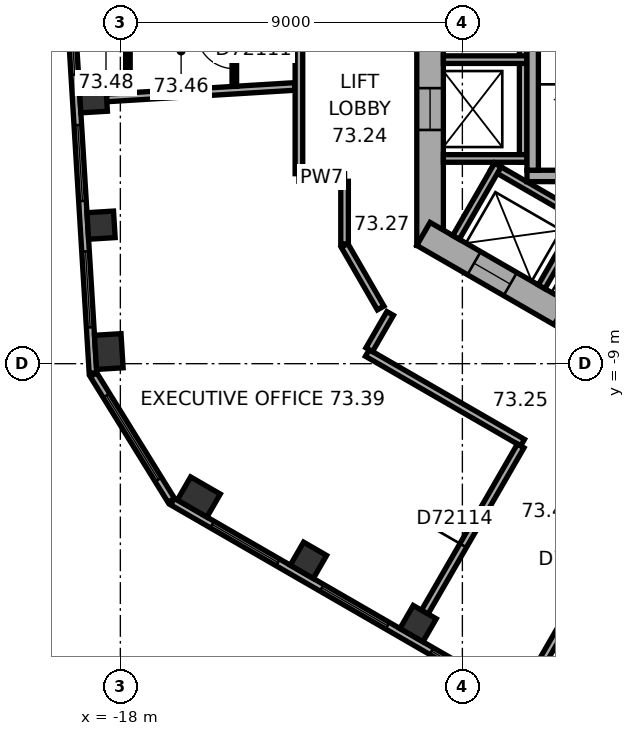
"""IFC4 building model, lengths in metres.
Left out: names, types, materials, properties, quantities, classifications, styles, units other than length and angle.
Written with IfcOpenShell. Run it as: python <this file> out.ifc"""

import sys

from ifc_helpers import new_model, si_unit, direction, frame, frame_2d, origin, origin_2d, place, context, subcontext, project, spatial, rectangle, extrude, element, fill, save


model = new_model("IFC4")
c1 = context("Model", 3, precision=1e-05, world=origin(), true_north=direction((0.0, 1.0)))
c2 = subcontext(c1, "Body", "Model", "MODEL_VIEW")
j1 = project(units=[si_unit("LENGTHUNIT", "METRE"), si_unit("PLANEANGLEUNIT", "RADIAN")], contexts=[c1])
p1 = place(None, origin())
s1 = spatial("IfcSite", under=j1, at=p1, CompositionType="ELEMENT")
p2 = place(p1, origin())
s2 = spatial("IfcBuilding", under=s1, at=p2, CompositionType="ELEMENT")
p3 = place(p2, frame((0.0, 0.0, 296.8)))
s3 = spatial("IfcBuildingStorey", under=s2, at=p3, CompositionType="ELEMENT", Elevation=296.8)
for number, where, z_axis, x_axis in (
    (1, (-18.711, -2.03, 0.0), (0.0, 0.0, 1.0), (0.061, -0.998, 0.0)),
    (2, (-18.508, -5.355, 0.0), (0.0, 0.0, 1.0), (0.061, -0.998, 0.0)),
):
    element("IfcColumn", number, at=place(p3, frame(where, z_axis=z_axis, x_axis=x_axis)), inside=s3, PredefinedType="COLUMN", context=c2, shape_type="SweptSolid", body=[
        extrude(rectangle(XDim=0.7, YDim=0.7, at=origin_2d()), origin(), (0.0, 0.0, 1.0), 3.7),
    ])
for number, where, z_axis, x_axis in (
    (3, (-18.304, -8.68, 0.0), (0.0, 0.0, 1.0), (0.061, -0.998, 0.0)),
    (4, (-15.936, -12.508, 0.0), (0.0, 0.0, 1.0), (0.866, -0.5, 0.0)),
):
    element("IfcColumn", number, at=place(p3, frame(where, z_axis=z_axis, x_axis=x_axis)), inside=s3, PredefinedType="COLUMN", context=c2, shape_type="SweptSolid", body=[
        extrude(rectangle(XDim=0.9, YDim=0.7, at=origin_2d()), origin(), (0.0, 0.0, 1.0), 3.7),
    ])
for number, where, z_axis, x_axis in (
    (5, (-13.05, -14.174, 0.0), (0.0, 0.0, 1.0), (0.866, -0.5, 0.0)),
    (6, (-10.165, -15.84, 0.0), (0.0, 0.0, 1.0), (0.866, -0.5, 0.0)),
):
    element("IfcColumn", number, at=place(p3, frame(where, z_axis=z_axis, x_axis=x_axis)), inside=s3, PredefinedType="COLUMN", context=c2, shape_type="SweptSolid", body=[
        extrude(rectangle(XDim=0.7, YDim=0.7, at=origin_2d()), origin(), (0.0, 0.0, 1.0), 3.7),
    ])
p4 = place(p3, frame((-9.85, 5.889, 0.0), z_axis=(0.0, 0.0, 1.0), x_axis=(0.0, -1.0, 0.0)))
e7 = element("IfcWall", 7, at=p4, inside=s3, PredefinedType="SHEAR", context=c2, shape_type="SweptSolid", body=[
    extrude(rectangle(XDim=11.778, YDim=0.7, at=frame_2d((5.889, 0.0))), origin(), (0.0, 0.0, 1.0), 3.7),
])
p5 = place(p4, frame((5.039, 0.0, 0.0)))
e8 = element("IfcOpeningElement", 8, at=p5, cuts=e7, PredefinedType="OPENING", context=c2, shape_type="SweptSolid", body=[
    extrude(rectangle(XDim=1.1, YDim=2.1, at=frame_2d((0.55, 1.05))), frame((0.0, 0.36, 0.0), z_axis=(0.0, -1.0, 0.0), x_axis=(1.0, 0.0, 0.0)), (0.0, 0.0, 1.0), 0.72),
])
p6 = place(p4, frame((7.639, 0.0, 0.0)))
e9 = element("IfcOpeningElement", 9, at=p6, cuts=e7, PredefinedType="OPENING", context=c2, shape_type="SweptSolid", body=[
    extrude(rectangle(XDim=1.1, YDim=2.1, at=frame_2d((0.55, 1.05))), frame((0.0, 0.36, 0.0), z_axis=(0.0, -1.0, 0.0), x_axis=(1.0, 0.0, 0.0)), (0.0, 0.0, 1.0), 0.72),
])
p7 = place(p3, frame((-10.025, -5.586, 0.0), z_axis=(0.0, 0.0, 1.0), x_axis=(0.866026453023, -0.499998182661, 0.0)))
e10 = element("IfcWall", 10, at=p7, inside=s3, PredefinedType="SHEAR", context=c2, shape_type="SweptSolid", body=[
    extrude(rectangle(XDim=11.778, YDim=0.7, at=frame_2d((5.889, 0.0))), origin(), (0.0, 0.0, 1.0), 3.7),
])
p8 = place(p7, frame((6.089, 0.0, 0.0)))
e11 = element("IfcOpeningElement", 11, at=p8, cuts=e10, PredefinedType="OPENING", context=c2, shape_type="SweptSolid", body=[
    extrude(rectangle(XDim=1.5, YDim=2.1, at=frame_2d((0.75, 1.05))), frame((0.0, 0.36, 0.0), z_axis=(0.0, -1.0, 0.0), x_axis=(1.0, 0.0, 0.0)), (0.0, 0.0, 1.0), 0.72),
])
p9 = place(p7, frame((1.539, 0.0, 0.0)))
e12 = element("IfcOpeningElement", 12, at=p9, cuts=e10, PredefinedType="OPENING", context=c2, shape_type="SweptSolid", body=[
    extrude(rectangle(XDim=1.1, YDim=2.1, at=frame_2d((0.55, 1.05))), frame((0.0, 0.36, 0.0), z_axis=(0.0, -1.0, 0.0), x_axis=(1.0, 0.0, 0.0)), (0.0, 0.0, 1.0), 0.72),
])
p10 = place(p7, frame((4.139, 0.0, 0.0)))
e13 = element("IfcOpeningElement", 13, at=p10, cuts=e10, PredefinedType="OPENING", context=c2, shape_type="SweptSolid", body=[
    extrude(rectangle(XDim=1.1, YDim=2.1, at=frame_2d((0.55, 1.05))), frame((0.0, 0.36, 0.0), z_axis=(0.0, -1.0, 0.0), x_axis=(1.0, 0.0, 0.0)), (0.0, 0.0, 1.0), 0.72),
])
p11 = place(p3, frame((-19.803, 8.454, 0.0), z_axis=(0.0, 0.0, 1.0), x_axis=(0.061036717565, -0.998135521414, 0.0)))
e14 = element("IfcWall", 14, at=p11, inside=s3, PredefinedType="STANDARD", context=c2, shape_type="SweptSolid", body=[
    extrude(rectangle(XDim=17.731, YDim=0.2, at=frame_2d((8.866, 0.0))), origin(), (0.0, 0.0, 1.0), 3.7),
])
p12 = place(p11, frame((1.202, 0.0, 0.9)))
e15 = element("IfcOpeningElement", 15, at=p12, cuts=e14, PredefinedType="OPENING", context=c2, shape_type="SweptSolid", body=[
    extrude(rectangle(XDim=2.0, YDim=2.0, at=frame_2d((1.0, 1.0))), frame((0.0, 0.11, 0.0), z_axis=(0.0, -1.0, 0.0), x_axis=(1.0, 0.0, 0.0)), (0.0, 0.0, 1.0), 0.22),
])
p13 = place(p11, frame((4.533, 0.0, 0.9)))
e16 = element("IfcOpeningElement", 16, at=p13, cuts=e14, PredefinedType="OPENING", context=c2, shape_type="SweptSolid", body=[
    extrude(rectangle(XDim=2.0, YDim=2.0, at=frame_2d((1.0, 1.0))), frame((0.0, 0.11, 0.0), z_axis=(0.0, -1.0, 0.0), x_axis=(1.0, 0.0, 0.0)), (0.0, 0.0, 1.0), 0.22),
])
p14 = place(p11, frame((7.865, 0.0, 0.9)))
e17 = element("IfcOpeningElement", 17, at=p14, cuts=e14, PredefinedType="OPENING", context=c2, shape_type="SweptSolid", body=[
    extrude(rectangle(XDim=2.0, YDim=2.0, at=frame_2d((1.0, 1.0))), frame((0.0, 0.11, 0.0), z_axis=(0.0, -1.0, 0.0), x_axis=(1.0, 0.0, 0.0)), (0.0, 0.0, 1.0), 0.22),
])
p15 = place(p11, frame((11.197, 0.0, 0.9)))
e18 = element("IfcOpeningElement", 18, at=p15, cuts=e14, PredefinedType="OPENING", context=c2, shape_type="SweptSolid", body=[
    extrude(rectangle(XDim=2.0, YDim=2.0, at=frame_2d((1.0, 1.0))), frame((0.0, 0.11, 0.0), z_axis=(0.0, -1.0, 0.0), x_axis=(1.0, 0.0, 0.0)), (0.0, 0.0, 1.0), 0.22),
])
p16 = place(p11, frame((14.528, 0.0, 0.9)))
e19 = element("IfcOpeningElement", 19, at=p16, cuts=e14, PredefinedType="OPENING", context=c2, shape_type="SweptSolid", body=[
    extrude(rectangle(XDim=2.0, YDim=2.0, at=frame_2d((1.0, 1.0))), frame((0.0, 0.11, 0.0), z_axis=(0.0, -1.0, 0.0), x_axis=(1.0, 0.0, 0.0)), (0.0, 0.0, 1.0), 0.22),
])
p17 = place(p3, frame((-18.706, -9.291, 0.0), z_axis=(0.0, 0.0, 1.0), x_axis=(0.526209683648, -0.850354848775, 0.0)))
e20 = element("IfcWall", 20, at=p17, inside=s3, PredefinedType="STANDARD", context=c2, shape_type="SweptSolid", body=[
    extrude(rectangle(XDim=3.886, YDim=0.2, at=frame_2d((1.943, 0.0))), origin(), (0.0, 0.0, 1.0), 3.7),
])
p18 = place(p17, frame((0.643, 0.0, 0.9)))
e21 = element("IfcOpeningElement", 21, at=p18, cuts=e20, PredefinedType="OPENING", context=c2, shape_type="SweptSolid", body=[
    extrude(rectangle(XDim=2.6, YDim=2.0, at=frame_2d((1.3, 1.0))), frame((0.0, 0.11, 0.0), z_axis=(0.0, -1.0, 0.0), x_axis=(1.0, 0.0, 0.0)), (0.0, 0.0, 1.0), 0.22),
])
p19 = place(p3, frame((-16.626, -12.629, 0.0), z_axis=(0.0, 0.0, 1.0), x_axis=(0.866026460444, -0.499998169808, 0.0)))
e22 = element("IfcWall", 22, at=p19, inside=s3, PredefinedType="STANDARD", context=c2, shape_type="SweptSolid", body=[
    extrude(rectangle(XDim=17.731, YDim=0.2, at=frame_2d((8.866, 0.0))), origin(), (0.0, 0.0, 1.0), 3.7),
])
p20 = place(p19, frame((1.203, 0.0, 0.9)))
e23 = element("IfcOpeningElement", 23, at=p20, cuts=e22, PredefinedType="OPENING", context=c2, shape_type="SweptSolid", body=[
    extrude(rectangle(XDim=2.0, YDim=2.0, at=frame_2d((1.0, 1.0))), frame((0.0, 0.11, 0.0), z_axis=(0.0, -1.0, 0.0), x_axis=(1.0, 0.0, 0.0)), (0.0, 0.0, 1.0), 0.22),
])
p21 = place(p19, frame((4.535, 0.0, 0.9)))
e24 = element("IfcOpeningElement", 24, at=p21, cuts=e22, PredefinedType="OPENING", context=c2, shape_type="SweptSolid", body=[
    extrude(rectangle(XDim=2.0, YDim=2.0, at=frame_2d((1.0, 1.0))), frame((0.0, 0.11, 0.0), z_axis=(0.0, -1.0, 0.0), x_axis=(1.0, 0.0, 0.0)), (0.0, 0.0, 1.0), 0.22),
])
p22 = place(p19, frame((7.867, 0.0, 0.9)))
e25 = element("IfcOpeningElement", 25, at=p22, cuts=e22, PredefinedType="OPENING", context=c2, shape_type="SweptSolid", body=[
    extrude(rectangle(XDim=2.0, YDim=2.0, at=frame_2d((1.0, 1.0))), frame((0.0, 0.11, 0.0), z_axis=(0.0, -1.0, 0.0), x_axis=(1.0, 0.0, 0.0)), (0.0, 0.0, 1.0), 0.22),
])
p23 = place(p19, frame((11.198, 0.0, 0.9)))
e26 = element("IfcOpeningElement", 26, at=p23, cuts=e22, PredefinedType="OPENING", context=c2, shape_type="SweptSolid", body=[
    extrude(rectangle(XDim=2.0, YDim=2.0, at=frame_2d((1.0, 1.0))), frame((0.0, 0.11, 0.0), z_axis=(0.0, -1.0, 0.0), x_axis=(1.0, 0.0, 0.0)), (0.0, 0.0, 1.0), 0.22),
])
p24 = place(p19, frame((14.53, 0.0, 0.9)))
e27 = element("IfcOpeningElement", 27, at=p24, cuts=e22, PredefinedType="OPENING", context=c2, shape_type="SweptSolid", body=[
    extrude(rectangle(XDim=2.0, YDim=2.0, at=frame_2d((1.0, 1.0))), frame((0.0, 0.11, 0.0), z_axis=(0.0, -1.0, 0.0), x_axis=(1.0, 0.0, 0.0)), (0.0, 0.0, 1.0), 0.22),
])
p25 = place(p3, frame((-7.4, 4.3, 0.0), z_axis=(0.0, 0.0, 1.0), x_axis=(0.0, -1.0, 0.0)))
e28 = element("IfcWall", 28, at=p25, inside=s3, PredefinedType="PARTITIONING", context=c2, shape_type="SweptSolid", body=[
    extrude(rectangle(XDim=8.0, YDim=0.2, at=frame_2d((4.0, 0.0))), origin(), (0.0, 0.0, 1.0), 3.35),
])
for number, where, z_axis, x_axis in (
    (29, (-7.3, -1.0, 0.0), (0.0, 0.0, 1.0), (-1.0, 0.0, 0.0)),
    (30, (-7.3, -3.6, 0.0), (0.0, 0.0, 1.0), (-1.0, 0.0, 0.0)),
):
    element("IfcWall", number, at=place(p3, frame(where, z_axis=z_axis, x_axis=x_axis)), inside=s3, PredefinedType="PARTITIONING", context=c2, shape_type="SweptSolid", body=[
        extrude(rectangle(XDim=2.2, YDim=0.2, at=frame_2d((1.1, 0.0))), origin(), (0.0, 0.0, 1.0), 3.35),
    ])
p26 = place(p3, frame((-8.203, -3.809, 0.0), z_axis=(0.0, 0.0, 1.0), x_axis=(0.866028230842, -0.499995103361, 0.0)))
e31 = element("IfcWall", 31, at=p26, inside=s3, PredefinedType="PARTITIONING", context=c2, shape_type="SweptSolid", body=[
    extrude(rectangle(XDim=5.4, YDim=0.2, at=frame_2d((2.7, 0.0))), origin(), (0.0, 0.0, 1.0), 3.35),
])
for number, where, z_axis, x_axis in (
    (32, (-8.067, -3.772, 0.0), (0.0, 0.0, 1.0), (-0.5, -0.866, 0.0)),
    (33, (-5.815, -5.072, 0.0), (0.0, 0.0, 1.0), (-0.5, -0.866, 0.0)),
):
    element("IfcWall", number, at=place(p3, frame(where, z_axis=z_axis, x_axis=x_axis)), inside=s3, PredefinedType="PARTITIONING", context=c2, shape_type="SweptSolid", body=[
        extrude(rectangle(XDim=2.2, YDim=0.2, at=frame_2d((1.1, 0.0))), origin(), (0.0, 0.0, 1.0), 3.35),
    ])
p27 = place(p3, frame((-2.6, -4.06, 0.0), z_axis=(0.0, 0.0, 1.0), x_axis=(-1.0, 0.0, 0.0)))
e34 = element("IfcWall", 34, at=p27, inside=s3, PredefinedType="SHEAR", context=c2, shape_type="SweptSolid", body=[
    extrude(rectangle(XDim=4.7, YDim=0.3, at=frame_2d((2.35, 0.0))), origin(), (0.0, 0.0, 1.0), 3.35),
])
p28 = place(p3, frame((-7.15, 3.15, 0.0), z_axis=(0.0, 0.0, 1.0), x_axis=(0.0, -1.0, 0.0)))
e35 = element("IfcWall", 35, at=p28, inside=s3, PredefinedType="SHEAR", context=c2, shape_type="SweptSolid", body=[
    extrude(rectangle(XDim=7.06, YDim=0.3, at=frame_2d((3.53, 0.0))), origin(), (0.0, 0.0, 1.0), 3.35),
])
p29 = place(p3, frame((-18.362, -2.008, 0.0), z_axis=(0.0, 0.0, 1.0), x_axis=(0.998135748374, 0.061033005966, 0.0)))
e36 = element("IfcWall", 36, at=p29, inside=s3, PredefinedType="PARTITIONING", context=c2, shape_type="SweptSolid", body=[
    extrude(rectangle(XDim=4.96, YDim=0.2, at=frame_2d((2.48, 0.0))), origin(), (0.0, 0.0, 1.0), 3.35),
])
p30 = place(p3, frame((-17.801, 0.226, 0.0), z_axis=(0.0, 0.0, 1.0), x_axis=(0.0, -1.0, 0.0)))
e37 = element("IfcWall", 37, at=p30, inside=s3, PredefinedType="PARTITIONING", context=c2, shape_type="SweptSolid", body=[
    extrude(rectangle(XDim=2.1, YDim=0.12, at=frame_2d((1.05, 0.0))), origin(), (0.0, 0.0, 1.0), 3.35),
])
p31 = place(p3, frame((-15.001, 4.773, 0.0), z_axis=(0.0, 0.0, 1.0), x_axis=(0.0, -1.0, 0.0)))
e38 = element("IfcWall", 38, at=p31, inside=s3, PredefinedType="PARTITIONING", context=c2, shape_type="SweptSolid", body=[
    extrude(rectangle(XDim=6.476, YDim=0.12, at=frame_2d((3.238, 0.0))), origin(), (0.0, 0.0, 1.0), 3.35),
])
p32 = place(p31, frame((5.011, 0.0, 0.0)))
e39 = element("IfcOpeningElement", 39, at=p32, cuts=e38, PredefinedType="OPENING", context=c2, shape_type="SweptSolid", body=[
    extrude(rectangle(XDim=1.0, YDim=2.1, at=frame_2d((0.5, 1.05))), frame((0.0, 0.07, 0.0), z_axis=(0.0, -1.0, 0.0), x_axis=(1.0, 0.0, 0.0)), (0.0, 0.0, 1.0), 0.14),
])
p33 = place(p31, frame((0.8, 0.0, 0.0)))
e40 = element("IfcOpeningElement", 40, at=p33, cuts=e38, PredefinedType="OPENING", context=c2, shape_type="SweptSolid", body=[
    extrude(rectangle(XDim=0.9, YDim=2.1, at=frame_2d((0.45, 1.05))), frame((0.0, 0.07, 0.0), z_axis=(0.0, -1.0, 0.0), x_axis=(1.0, 0.0, 0.0)), (0.0, 0.0, 1.0), 0.14),
])
p34 = place(p31, frame((3.073, 0.0, 0.0)))
e41 = element("IfcOpeningElement", 41, at=p34, cuts=e38, PredefinedType="OPENING", context=c2, shape_type="SweptSolid", body=[
    extrude(rectangle(XDim=0.9, YDim=2.1, at=frame_2d((0.45, 1.05))), frame((0.0, 0.07, 0.0), z_axis=(0.0, -1.0, 0.0), x_axis=(1.0, 0.0, 0.0)), (0.0, 0.0, 1.0), 0.14),
])
p35 = place(p3, frame((-13.301, -4.101, 0.0), z_axis=(0.0, 0.0, 1.0), x_axis=(1.0, 0.0, 0.0)))
e42 = element("IfcWall", 42, at=p35, inside=s3, PredefinedType="PARTITIONING", context=c2, shape_type="SweptSolid", body=[
    extrude(rectangle(XDim=1.201, YDim=0.2, at=frame_2d((0.601, 0.0))), origin(), (0.0, 0.0, 1.0), 3.35),
])
p36 = place(p3, frame((-13.301, 2.101, 0.0), z_axis=(0.0, 0.0, 1.0), x_axis=(0.0, -1.0, 0.0)))
e43 = element("IfcWall", 43, at=p36, inside=s3, PredefinedType="PARTITIONING", context=c2, shape_type="SweptSolid", body=[
    extrude(rectangle(XDim=6.102, YDim=0.2, at=frame_2d((3.051, 0.0))), origin(), (0.0, 0.0, 1.0), 3.35),
])
p37 = place(p36, frame((1.4, 0.0, 0.0)))
e44 = element("IfcOpeningElement", 44, at=p37, cuts=e43, PredefinedType="OPENING", context=c2, shape_type="SweptSolid", body=[
    extrude(rectangle(XDim=1.0, YDim=2.1, at=frame_2d((0.5, 1.05))), frame((0.0, 0.11, 0.0), z_axis=(0.0, -1.0, 0.0), x_axis=(1.0, 0.0, 0.0)), (0.0, 0.0, 1.0), 0.22),
])
p38 = place(p3, frame((-12.1, -5.889, 0.0), z_axis=(0.0, 0.0, 1.0), x_axis=(0.500063520245, -0.865988727248, 0.0)))
e45 = element("IfcWall", 45, at=p38, inside=s3, PredefinedType="PARTITIONING", context=c2, shape_type="SweptSolid", body=[
    extrude(rectangle(XDim=1.9, YDim=0.2, at=frame_2d((0.95, 0.0))), origin(), (0.0, 0.0, 1.0), 3.35),
])
p39 = place(p3, frame((-12.1, -4.201, 0.0), z_axis=(0.0, 0.0, 1.0), x_axis=(0.0, -1.0, 0.0)))
e46 = element("IfcWall", 46, at=p39, inside=s3, PredefinedType="PARTITIONING", context=c2, shape_type="SweptSolid", body=[
    extrude(rectangle(XDim=1.648, YDim=0.2, at=frame_2d((0.824, 0.0))), origin(), (0.0, 0.0, 1.0), 3.35),
])
p40 = place(p3, frame((-11.501, -8.719, 0.0), z_axis=(0.0, 0.0, 1.0), x_axis=(0.866024434742, -0.500001678427, 0.0)))
e47 = element("IfcWall", 47, at=p40, inside=s3, PredefinedType="PARTITIONING", context=c2, shape_type="SweptSolid", body=[
    extrude(rectangle(XDim=4.718, YDim=0.2, at=frame_2d((2.359, 0.0))), origin(), (0.0, 0.0, 1.0), 3.35),
])
p41 = place(p3, frame((-10.901, -7.678, 0.0), z_axis=(0.0, 0.0, 1.0), x_axis=(-0.500074377092, -0.865982457891, 0.0)))
e48 = element("IfcWall", 48, at=p41, inside=s3, PredefinedType="PARTITIONING", context=c2, shape_type="SweptSolid", body=[
    extrude(rectangle(XDim=1.101, YDim=0.2, at=frame_2d((0.55, 0.0))), origin(), (0.0, 0.0, 1.0), 3.35),
])
p42 = place(p3, frame((-9.99, -15.537, 0.0), z_axis=(0.0, 0.0, 1.0), x_axis=(0.499966611936, 0.866044679534, 0.0)))
e49 = element("IfcWall", 49, at=p42, inside=s3, PredefinedType="PARTITIONING", context=c2, shape_type="SweptSolid", body=[
    extrude(rectangle(XDim=5.049, YDim=0.2, at=frame_2d((2.524, 0.0))), origin(), (0.0, 0.0, 1.0), 2.65),
])
p43 = place(p42, frame((2.024, 0.0, 0.0)))
e50 = element("IfcOpeningElement", 50, at=p43, cuts=e49, PredefinedType="OPENING", context=c2, shape_type="SweptSolid", body=[
    extrude(rectangle(XDim=1.0, YDim=2.1, at=frame_2d((0.5, 1.05))), frame((0.0, 0.11, 0.0), z_axis=(0.0, -1.0, 0.0), x_axis=(1.0, 0.0, 0.0)), (0.0, 0.0, 1.0), 0.22),
])
p44 = place(p3, frame((-7.105, -17.202, 0.0), z_axis=(0.0, 0.0, 1.0), x_axis=(0.499988692146, 0.866031932279, 0.0)))
e51 = element("IfcWall", 51, at=p44, inside=s3, PredefinedType="PARTITIONING", context=c2, shape_type="SweptSolid", body=[
    extrude(rectangle(XDim=6.35, YDim=0.2, at=frame_2d((3.175, 0.0))), origin(), (0.0, 0.0, 1.0), 3.35),
])
p45 = place(p44, frame((2.675, 0.0, 0.0)))
e52 = element("IfcOpeningElement", 52, at=p45, cuts=e51, PredefinedType="OPENING", context=c2, shape_type="SweptSolid", body=[
    extrude(rectangle(XDim=1.0, YDim=2.1, at=frame_2d((0.5, 1.05))), frame((0.0, 0.11, 0.0), z_axis=(0.0, -1.0, 0.0), x_axis=(1.0, 0.0, 0.0)), (0.0, 0.0, 1.0), 0.22),
])
p46 = place(p14, origin())
e53 = element("IfcWindow", 53, at=p46, inside=s3, PartitioningType="SINGLE_PANEL", PredefinedType="WINDOW", context=c2, shape_type="SweptSolid", body=[
    extrude(rectangle(XDim=2.0, YDim=2.0, at=frame_2d((1.0, 1.0))), frame((0.0, 0.03, 0.0), z_axis=(0.0, -1.0, 0.0), x_axis=(1.0, 0.0, 0.0)), (0.0, 0.0, 1.0), 0.06),
])
fill(e17, e53)
p47 = place(p15, origin())
e54 = element("IfcWindow", 54, at=p47, inside=s3, PartitioningType="SINGLE_PANEL", PredefinedType="WINDOW", context=c2, shape_type="SweptSolid", body=[
    extrude(rectangle(XDim=2.0, YDim=2.0, at=frame_2d((1.0, 1.0))), frame((0.0, 0.03, 0.0), z_axis=(0.0, -1.0, 0.0), x_axis=(1.0, 0.0, 0.0)), (0.0, 0.0, 1.0), 0.06),
])
fill(e18, e54)
p48 = place(p16, origin())
e55 = element("IfcWindow", 55, at=p48, inside=s3, PartitioningType="SINGLE_PANEL", PredefinedType="WINDOW", context=c2, shape_type="SweptSolid", body=[
    extrude(rectangle(XDim=2.0, YDim=2.0, at=frame_2d((1.0, 1.0))), frame((0.0, 0.03, 0.0), z_axis=(0.0, -1.0, 0.0), x_axis=(1.0, 0.0, 0.0)), (0.0, 0.0, 1.0), 0.06),
])
fill(e19, e55)
p49 = place(p18, origin())
e56 = element("IfcWindow", 56, at=p49, inside=s3, PartitioningType="SINGLE_PANEL", PredefinedType="WINDOW", context=c2, shape_type="SweptSolid", body=[
    extrude(rectangle(XDim=2.6, YDim=2.0, at=frame_2d((1.3, 1.0))), frame((0.0, 0.03, 0.0), z_axis=(0.0, -1.0, 0.0), x_axis=(1.0, 0.0, 0.0)), (0.0, 0.0, 1.0), 0.06),
])
fill(e21, e56)
p50 = place(p20, origin())
e57 = element("IfcWindow", 57, at=p50, inside=s3, PartitioningType="SINGLE_PANEL", PredefinedType="WINDOW", context=c2, shape_type="SweptSolid", body=[
    extrude(rectangle(XDim=2.0, YDim=2.0, at=frame_2d((1.0, 1.0))), frame((0.0, 0.03, 0.0), z_axis=(0.0, -1.0, 0.0), x_axis=(1.0, 0.0, 0.0)), (0.0, 0.0, 1.0), 0.06),
])
fill(e23, e57)
p51 = place(p21, origin())
e58 = element("IfcWindow", 58, at=p51, inside=s3, PartitioningType="SINGLE_PANEL", PredefinedType="WINDOW", context=c2, shape_type="SweptSolid", body=[
    extrude(rectangle(XDim=2.0, YDim=2.0, at=frame_2d((1.0, 1.0))), frame((0.0, 0.03, 0.0), z_axis=(0.0, -1.0, 0.0), x_axis=(1.0, 0.0, 0.0)), (0.0, 0.0, 1.0), 0.06),
])
fill(e24, e58)
p52 = place(p22, origin())
e59 = element("IfcWindow", 59, at=p52, inside=s3, PartitioningType="SINGLE_PANEL", PredefinedType="WINDOW", context=c2, shape_type="SweptSolid", body=[
    extrude(rectangle(XDim=2.0, YDim=2.0, at=frame_2d((1.0, 1.0))), frame((0.0, 0.03, 0.0), z_axis=(0.0, -1.0, 0.0), x_axis=(1.0, 0.0, 0.0)), (0.0, 0.0, 1.0), 0.06),
])
fill(e25, e59)
p53 = place(p6, origin())
e60 = element("IfcDoor", 60, at=p53, inside=s3, OperationType="DOUBLE_DOOR_SLIDING", PredefinedType="DOOR", context=c2, shape_type="SweptSolid", body=[
    extrude(rectangle(XDim=1.1, YDim=2.1, at=frame_2d((0.55, 1.05))), frame((0.0, 0.025, 0.0), z_axis=(0.0, -1.0, 0.0), x_axis=(1.0, 0.0, 0.0)), (0.0, 0.0, 1.0), 0.05),
])
fill(e9, e60)
p54 = place(p9, origin())
e61 = element("IfcDoor", 61, at=p54, inside=s3, OperationType="DOUBLE_DOOR_SLIDING", PredefinedType="DOOR", context=c2, shape_type="SweptSolid", body=[
    extrude(rectangle(XDim=1.1, YDim=2.1, at=frame_2d((0.55, 1.05))), frame((0.0, 0.025, 0.0), z_axis=(0.0, -1.0, 0.0), x_axis=(1.0, 0.0, 0.0)), (0.0, 0.0, 1.0), 0.05),
])
fill(e12, e61)
p55 = place(p32, origin())
e62 = element("IfcDoor", 62, at=p55, inside=s3, OperationType="SINGLE_SWING_LEFT", PredefinedType="DOOR", context=c2, shape_type="SweptSolid", body=[
    extrude(rectangle(XDim=1.0, YDim=2.1, at=frame_2d((0.5, 1.05))), frame((0.0, 0.025, 0.0), z_axis=(0.0, -1.0, 0.0), x_axis=(1.0, 0.0, 0.0)), (0.0, 0.0, 1.0), 0.05),
])
fill(e39, e62)
p56 = place(p43, origin())
e63 = element("IfcDoor", 63, at=p56, inside=s3, OperationType="SINGLE_SWING_LEFT", PredefinedType="DOOR", context=c2, shape_type="SweptSolid", body=[
    extrude(rectangle(XDim=1.0, YDim=2.1, at=frame_2d((0.5, 1.05))), frame((0.0, 0.025, 0.0), z_axis=(0.0, -1.0, 0.0), x_axis=(1.0, 0.0, 0.0)), (0.0, 0.0, 1.0), 0.05),
])
fill(e50, e63)
save(model, sys.argv[1])
